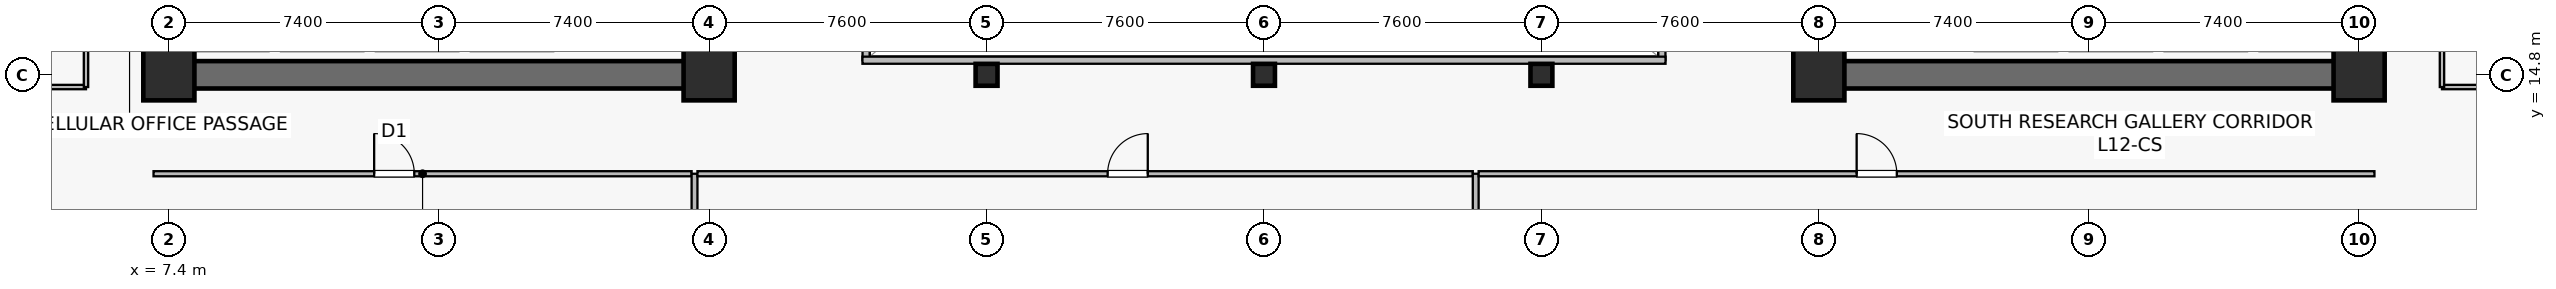
"""IFC4 building model, lengths in metres.
Left out: names, types, materials, properties, quantities, classifications, styles, units other than length and angle.
Written with IfcOpenShell. Run it as: python <this file> out.ifc"""

import sys

from ifc_helpers import new_model, si_unit, direction, frame, frame_2d, origin, origin_2d, place, context, subcontext, project, spatial, rectangle, hollow_rectangle, extrude, source, transform, mapped, element, fill, save


model = new_model("IFC4")
c1 = context("Model", 3, precision=1e-05, world=origin(), true_north=direction((0.0, 1.0)))
c2 = subcontext(c1, "Body", "Model", "MODEL_VIEW")
j1 = project(units=[si_unit("LENGTHUNIT", "METRE"), si_unit("PLANEANGLEUNIT", "RADIAN")], contexts=[c1])
p1 = place(None, origin())
s1 = spatial("IfcSite", under=j1, at=p1, CompositionType="ELEMENT")
p2 = place(p1, origin())
s2 = spatial("IfcBuilding", under=s1, at=p2, CompositionType="ELEMENT")
p3 = place(p2, frame((0.0, 0.0, 49.8)))
s3 = spatial("IfcBuildingStorey", under=s2, at=p3, CompositionType="ELEMENT", Elevation=49.8)
p4 = place(p3, frame((7.025, 14.8, 0.0), z_axis=(0.0, 0.0, 1.0), x_axis=(1.0, 0.0, 0.0)))
e1 = element("IfcWall", 1, at=p4, inside=s3, PredefinedType="SHEAR", context=c2, shape_type="SweptSolid", body=[
    extrude(rectangle(XDim=15.55, YDim=0.75, at=frame_2d((7.775, 0.0))), origin(), (0.0, 0.0, 1.0), 3.78),
])
p5 = place(p3, frame((7.4, 15.175, 0.0), z_axis=(0.0, 0.0, 1.0), x_axis=(0.0, 1.0, 0.0)))
e2 = element("IfcWall", 2, at=p5, inside=s3, PredefinedType="SHEAR", context=c2, shape_type="SweptSolid", body=[
    extrude(rectangle(XDim=18.25, YDim=0.75, at=frame_2d((9.125, 0.0))), origin(), (0.0, 0.0, 1.0), 3.78),
])
p6 = place(p3, frame((22.2, 15.175, 0.0), z_axis=(0.0, 0.0, 1.0), x_axis=(0.0, 1.0, 0.0)))
e3 = element("IfcWall", 3, at=p6, inside=s3, PredefinedType="SHEAR", context=c2, shape_type="SweptSolid", body=[
    extrude(rectangle(XDim=18.25, YDim=0.75, at=frame_2d((9.125, 0.0))), origin(), (0.0, 0.0, 1.0), 3.78),
])
p7 = place(p6, frame((3.375, 0.0, 0.0)))
e4 = element("IfcOpeningElement", 4, at=p7, cuts=e3, PredefinedType="OPENING", context=c2, shape_type="SweptSolid", body=[
    extrude(rectangle(XDim=1.42, YDim=2.2, at=frame_2d((0.71, 1.1))), frame((0.0, 0.385, 0.0), z_axis=(0.0, -1.0, 0.0), x_axis=(1.0, 0.0, 0.0)), (0.0, 0.0, 1.0), 0.77),
])
p8 = place(p3, frame((52.225, 14.8, 0.0), z_axis=(0.0, 0.0, 1.0), x_axis=(1.0, 0.0, 0.0)))
e5 = element("IfcWall", 5, at=p8, inside=s3, PredefinedType="SHEAR", context=c2, shape_type="SweptSolid", body=[
    extrude(rectangle(XDim=15.55, YDim=0.75, at=frame_2d((7.775, 0.0))), origin(), (0.0, 0.0, 1.0), 3.78),
])
p9 = place(p3, frame((52.6, 15.175, 0.0), z_axis=(0.0, 0.0, 1.0), x_axis=(0.0, 1.0, 0.0)))
e6 = element("IfcWall", 6, at=p9, inside=s3, PredefinedType="SHEAR", context=c2, shape_type="SweptSolid", body=[
    extrude(rectangle(XDim=18.25, YDim=0.75, at=frame_2d((9.125, 0.0))), origin(), (0.0, 0.0, 1.0), 3.78),
])
p10 = place(p9, frame((3.375, 0.0, 0.0)))
e7 = element("IfcOpeningElement", 7, at=p10, cuts=e6, PredefinedType="OPENING", context=c2, shape_type="SweptSolid", body=[
    extrude(rectangle(XDim=1.42, YDim=2.2, at=frame_2d((0.71, 1.1))), frame((0.0, 0.385, 0.0), z_axis=(0.0, -1.0, 0.0), x_axis=(1.0, 0.0, 0.0)), (0.0, 0.0, 1.0), 0.77),
])
p11 = place(p3, frame((67.4, 15.175, 0.0), z_axis=(0.0, 0.0, 1.0), x_axis=(0.0, 1.0, 0.0)))
e8 = element("IfcWall", 8, at=p11, inside=s3, PredefinedType="SHEAR", context=c2, shape_type="SweptSolid", body=[
    extrude(rectangle(XDim=18.25, YDim=0.75, at=frame_2d((9.125, 0.0))), origin(), (0.0, 0.0, 1.0), 3.78),
])
m1 = source(origin(), c2, "Body", "SweptSolid", [
    extrude(rectangle(XDim=1.4, YDim=1.4, at=origin_2d()), origin(), (0.0, 0.0, 1.0), 4.1),
])
for number, where, z_axis, x_axis in (
    (9, (7.4, 14.8, 0.0), (0.0, 0.0, 1.0), (1.0, 0.0, 0.0)),
    (10, (22.2, 14.8, 0.0), (0.0, 0.0, 1.0), (1.0, 0.0, 0.0)),
    (11, (52.6, 14.8, 0.0), (0.0, 0.0, 1.0), (1.0, 0.0, 0.0)),
    (12, (67.4, 14.8, 0.0), (0.0, 0.0, 1.0), (1.0, 0.0, 0.0)),
):
    element("IfcColumn", number, at=place(p3, frame(where, z_axis=z_axis, x_axis=x_axis)), inside=s3, PredefinedType="COLUMN", context=c2, shape_type="MappedRepresentation", body=[
        mapped(m1, transform((0.0, 0.0, 0.0), scale=1.0)),
    ])
m2 = source(origin(), c2, "Body", "SweptSolid", [
    extrude(hollow_rectangle(XDim=0.6, YDim=0.6, WallThickness=0.028, at=origin_2d()), origin(), (0.0, 0.0, 1.0), 4.1),
])
for number, where, z_axis, x_axis in (
    (13, (29.8, 14.8, 0.0), (0.0, 0.0, 1.0), (1.0, 0.0, 0.0)),
    (14, (37.4, 14.8, 0.0), (0.0, 0.0, 1.0), (1.0, 0.0, 0.0)),
    (15, (45.0, 14.8, 0.0), (0.0, 0.0, 1.0), (1.0, 0.0, 0.0)),
):
    element("IfcColumn", number, at=place(p3, frame(where, z_axis=z_axis, x_axis=x_axis)), inside=s3, PredefinedType="COLUMN", context=c2, shape_type="MappedRepresentation", body=[
        mapped(m2, transform((0.0, 0.0, 0.0), scale=1.0)),
    ])
p12 = place(p3, frame((26.5, 15.2, 0.0), z_axis=(0.0, 0.0, 1.0), x_axis=(0.0, 1.0, 0.0)))
e16 = element("IfcWall", 16, at=p12, inside=s3, PredefinedType="SOLIDWALL", context=c2, shape_type="SweptSolid", body=[
    extrude(rectangle(XDim=18.2, YDim=0.195, at=frame_2d((9.1, 0.0))), origin(), (0.0, 0.0, 1.0), 3.78),
])
p13 = place(p12, frame((1.8, 0.0, 0.9)))
e17 = element("IfcOpeningElement", 17, at=p13, cuts=e16, PredefinedType="OPENING", context=c2, shape_type="SweptSolid", body=[
    extrude(rectangle(XDim=1.5, YDim=1.4, at=frame_2d((0.75, 0.7))), frame((0.0, 0.107, 0.0), z_axis=(0.0, -1.0, 0.0), x_axis=(1.0, 0.0, 0.0)), (0.0, 0.0, 1.0), 0.215),
])
p14 = place(p12, frame((13.2, 0.0, 0.9)))
e18 = element("IfcOpeningElement", 18, at=p14, cuts=e16, PredefinedType="OPENING", context=c2, shape_type="SweptSolid", body=[
    extrude(rectangle(XDim=1.5, YDim=1.4, at=frame_2d((0.75, 0.7))), frame((0.0, 0.107, 0.0), z_axis=(0.0, -1.0, 0.0), x_axis=(1.0, 0.0, 0.0)), (0.0, 0.0, 1.0), 0.215),
])
p15 = place(p3, frame((48.3, 15.2, 0.0), z_axis=(0.0, 0.0, 1.0), x_axis=(0.0, 1.0, 0.0)))
e19 = element("IfcWall", 19, at=p15, inside=s3, PredefinedType="SOLIDWALL", context=c2, shape_type="SweptSolid", body=[
    extrude(rectangle(XDim=18.2, YDim=0.195, at=frame_2d((9.1, 0.0))), origin(), (0.0, 0.0, 1.0), 3.78),
])
p16 = place(p15, frame((1.8, 0.0, 0.9)))
e20 = element("IfcOpeningElement", 20, at=p16, cuts=e19, PredefinedType="OPENING", context=c2, shape_type="SweptSolid", body=[
    extrude(rectangle(XDim=1.5, YDim=1.4, at=frame_2d((0.75, 0.7))), frame((0.0, 0.107, 0.0), z_axis=(0.0, -1.0, 0.0), x_axis=(1.0, 0.0, 0.0)), (0.0, 0.0, 1.0), 0.215),
])
p17 = place(p15, frame((13.2, 0.0, 0.9)))
e21 = element("IfcOpeningElement", 21, at=p17, cuts=e19, PredefinedType="OPENING", context=c2, shape_type="SweptSolid", body=[
    extrude(rectangle(XDim=1.5, YDim=1.4, at=frame_2d((0.75, 0.7))), frame((0.0, 0.107, 0.0), z_axis=(0.0, -1.0, 0.0), x_axis=(1.0, 0.0, 0.0)), (0.0, 0.0, 1.0), 0.215),
])
p18 = place(p3, frame((26.4, 15.2, 0.0), z_axis=(0.0, 0.0, 1.0), x_axis=(1.0, 0.0, 0.0)))
e22 = element("IfcWall", 22, at=p18, inside=s3, PredefinedType="SOLIDWALL", context=c2, shape_type="SweptSolid", body=[
    extrude(rectangle(XDim=22.0, YDim=0.195, at=frame_2d((11.0, 0.0))), origin(), (0.0, 0.0, 1.0), 3.78),
])
p19 = place(p3, frame((6.98, 12.09, 0.0), z_axis=(0.0, 0.0, 1.0), x_axis=(1.0, 0.0, 0.0)))
e23 = element("IfcWall", 23, at=p19, inside=s3, PredefinedType="PARTITIONING", context=c2, shape_type="SweptSolid", body=[
    extrude(rectangle(XDim=14.74, YDim=0.14, at=frame_2d((7.37, 0.0))), origin(), (0.0, 0.0, 1.0), 3.065),
])
p20 = place(p19, frame((6.044, 0.0, 0.0)))
e24 = element("IfcOpeningElement", 24, at=p20, cuts=e23, PredefinedType="OPENING", context=c2, shape_type="SweptSolid", body=[
    extrude(rectangle(XDim=1.1, YDim=2.18, at=frame_2d((0.55, 1.09))), frame((0.0, 0.08, 0.0), z_axis=(0.0, -1.0, 0.0), x_axis=(1.0, 0.0, 0.0)), (0.0, 0.0, 1.0), 0.16),
])
p21 = place(p3, frame((21.8, 0.11, 0.0), z_axis=(0.0, 0.0, 1.0), x_axis=(0.0, 1.0, 0.0)))
e25 = element("IfcWall", 25, at=p21, inside=s3, PredefinedType="PARTITIONING", context=c2, shape_type="SweptSolid", body=[
    extrude(rectangle(XDim=11.98, YDim=0.16, at=frame_2d((5.99, 0.0))), origin(), (0.0, 0.0, 1.0), 3.015),
])
p22 = place(p3, frame((21.88, 12.09, 0.0), z_axis=(0.0, 0.0, 1.0), x_axis=(1.0, 0.0, 0.0)))
e26 = element("IfcWall", 26, at=p22, inside=s3, PredefinedType="PARTITIONING", context=c2, shape_type="SweptSolid", body=[
    extrude(rectangle(XDim=21.24, YDim=0.14, at=frame_2d((10.62, 0.0))), origin(), (0.0, 0.0, 1.0), 3.065),
])
p23 = place(p22, frame((11.236, 0.0, 0.0)))
e27 = element("IfcOpeningElement", 27, at=p23, cuts=e26, PredefinedType="OPENING", context=c2, shape_type="SweptSolid", body=[
    extrude(rectangle(XDim=1.1, YDim=2.18, at=frame_2d((0.55, 1.09))), frame((0.0, 0.08, 0.0), z_axis=(0.0, -1.0, 0.0), x_axis=(1.0, 0.0, 0.0)), (0.0, 0.0, 1.0), 0.16),
])
p24 = place(p3, frame((43.2, 1.31, 0.0), z_axis=(0.0, 0.0, 1.0), x_axis=(0.0, 1.0, 0.0)))
e28 = element("IfcWall", 28, at=p24, inside=s3, PredefinedType="PARTITIONING", context=c2, shape_type="SweptSolid", body=[
    extrude(rectangle(XDim=10.78, YDim=0.16, at=frame_2d((5.39, 0.0))), origin(), (0.0, 0.0, 1.0), 3.015),
])
p25 = place(p3, frame((43.28, 12.09, 0.0), z_axis=(0.0, 0.0, 1.0), x_axis=(1.0, 0.0, 0.0)))
e29 = element("IfcWall", 29, at=p25, inside=s3, PredefinedType="PARTITIONING", context=c2, shape_type="SweptSolid", body=[
    extrude(rectangle(XDim=24.54, YDim=0.14, at=frame_2d((12.27, 0.0))), origin(), (0.0, 0.0, 1.0), 3.065),
])
p26 = place(p25, frame((10.356, 0.0, 0.0)))
e30 = element("IfcOpeningElement", 30, at=p26, cuts=e29, PredefinedType="OPENING", context=c2, shape_type="SweptSolid", body=[
    extrude(rectangle(XDim=1.1, YDim=2.18, at=frame_2d((0.55, 1.09))), frame((0.0, 0.08, 0.0), z_axis=(0.0, -1.0, 0.0), x_axis=(1.0, 0.0, 0.0)), (0.0, 0.0, 1.0), 0.16),
])
p27 = place(p3, frame((0.11, 14.465, 0.0), z_axis=(0.0, 0.0, 1.0), x_axis=(1.0, 0.0, 0.0)))
e31 = element("IfcWall", 31, at=p27, inside=s3, PredefinedType="PARTITIONING", context=c2, shape_type="SweptSolid", body=[
    extrude(rectangle(XDim=5.02, YDim=0.12, at=frame_2d((2.51, 0.0))), origin(), (0.0, 0.0, 1.0), 3.78),
])
p28 = place(p3, frame((5.13, 14.465, 0.0), z_axis=(0.0, 0.0, 1.0), x_axis=(0.0, 1.0, 0.0)))
e32 = element("IfcWall", 32, at=p28, inside=s3, PredefinedType="PARTITIONING", context=c2, shape_type="SweptSolid", body=[
    extrude(rectangle(XDim=4.675, YDim=0.12, at=frame_2d((2.337, 0.0))), origin(), (0.0, 0.0, 1.0), 3.78),
])
p29 = place(p28, frame((1.887, 0.0, 0.0)))
e33 = element("IfcOpeningElement", 33, at=p29, cuts=e32, PredefinedType="OPENING", context=c2, shape_type="SweptSolid", body=[
    extrude(rectangle(XDim=0.9, YDim=2.1, at=frame_2d((0.45, 1.05))), frame((0.0, 0.07, 0.0), z_axis=(0.0, -1.0, 0.0), x_axis=(1.0, 0.0, 0.0)), (0.0, 0.0, 1.0), 0.14),
])
p30 = place(p3, frame((69.67, 14.465, 0.0), z_axis=(0.0, 0.0, 1.0), x_axis=(1.0, 0.0, 0.0)))
e34 = element("IfcWall", 34, at=p30, inside=s3, PredefinedType="PARTITIONING", context=c2, shape_type="SweptSolid", body=[
    extrude(rectangle(XDim=5.02, YDim=0.12, at=frame_2d((2.51, 0.0))), origin(), (0.0, 0.0, 1.0), 3.78),
])
p31 = place(p3, frame((69.67, 14.465, 0.0), z_axis=(0.0, 0.0, 1.0), x_axis=(0.0, 1.0, 0.0)))
e35 = element("IfcWall", 35, at=p31, inside=s3, PredefinedType="PARTITIONING", context=c2, shape_type="SweptSolid", body=[
    extrude(rectangle(XDim=11.875, YDim=0.12, at=frame_2d((5.938, 0.0))), origin(), (0.0, 0.0, 1.0), 3.78),
])
p32 = place(p31, frame((5.488, 0.0, 0.0)))
e36 = element("IfcOpeningElement", 36, at=p32, cuts=e35, PredefinedType="OPENING", context=c2, shape_type="SweptSolid", body=[
    extrude(rectangle(XDim=0.9, YDim=2.1, at=frame_2d((0.45, 1.05))), frame((0.0, 0.07, 0.0), z_axis=(0.0, -1.0, 0.0), x_axis=(1.0, 0.0, 0.0)), (0.0, 0.0, 1.0), 0.14),
])
m3 = source(origin(), c2, "Body", "SweptSolid", [
    extrude(rectangle(XDim=1.1, YDim=2.18, at=frame_2d((0.55, 1.09))), frame((0.0, 0.025, 0.0), z_axis=(0.0, -1.0, 0.0), x_axis=(1.0, 0.0, 0.0)), (0.0, 0.0, 1.0), 0.05),
])
p33 = place(p20, origin())
e37 = element("IfcDoor", 37, at=p33, inside=s3, OperationType="SINGLE_SWING_LEFT", PredefinedType="DOOR", context=c2, shape_type="MappedRepresentation", body=[
    mapped(m3, transform((0.0, 0.0, 0.0), scale=1.0)),
])
fill(e24, e37)
p34 = place(p23, origin())
e38 = element("IfcDoor", 38, at=p34, inside=s3, OperationType="SINGLE_SWING_RIGHT", PredefinedType="DOOR", context=c2, shape_type="MappedRepresentation", body=[
    mapped(m3, transform((0.0, 0.0, 0.0), scale=1.0)),
])
fill(e27, e38)
p35 = place(p26, origin())
e39 = element("IfcDoor", 39, at=p35, inside=s3, OperationType="SINGLE_SWING_LEFT", PredefinedType="DOOR", context=c2, shape_type="MappedRepresentation", body=[
    mapped(m3, transform((0.0, 0.0, 0.0), scale=1.0)),
])
fill(e30, e39)
save(model, sys.argv[1])
